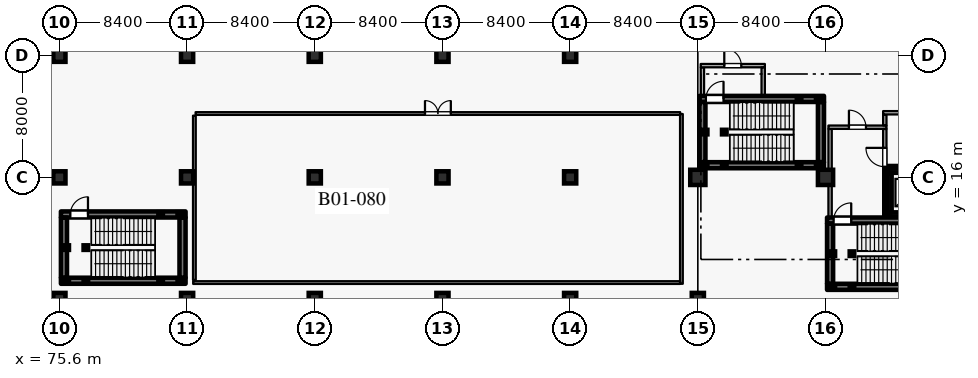
"""IFC4 building model, lengths in metres.
Left out: names, types, materials, properties, quantities, classifications, styles, units other than length and angle.
Written with IfcOpenShell. Run it as: python <this file> out.ifc"""

import sys

from ifc_helpers import new_model, si_unit, direction, frame, frame_2d, origin, origin_2d, place, context, subcontext, project, spatial, rectangle, hollow_rectangle, extrude, element, fill, save


model = new_model("IFC4")
c1 = context("Model", 3, precision=1e-05, world=origin(), true_north=direction((0.0, 1.0)))
c2 = subcontext(c1, "Body", "Model", "MODEL_VIEW")
j1 = project(units=[si_unit("LENGTHUNIT", "METRE"), si_unit("PLANEANGLEUNIT", "RADIAN")], contexts=[c1])
p1 = place(None, origin())
s1 = spatial("IfcSite", under=j1, at=p1, CompositionType="ELEMENT")
p2 = place(p1, origin())
s2 = spatial("IfcBuilding", under=s1, at=p2, CompositionType="ELEMENT")
p3 = place(p2, frame((0.0, 0.0, -5.4)))
s3 = spatial("IfcBuildingStorey", under=s2, at=p3, CompositionType="ELEMENT", Elevation=-5.4)
for number, where, z_axis, x_axis in (
    (1, (75.6, 8.0, 0.0), (0.0, 0.0, 1.0), (1.0, 0.0, 0.0)),
    (2, (75.6, 16.0, 0.0), (0.0, 0.0, 1.0), (1.0, 0.0, 0.0)),
    (3, (75.6, 24.0, 0.0), (0.0, 0.0, 1.0), (1.0, 0.0, 0.0)),
    (4, (84.0, 8.0, 0.0), (0.0, 0.0, 1.0), (1.0, 0.0, 0.0)),
    (5, (84.0, 16.0, 0.0), (0.0, 0.0, 1.0), (1.0, 0.0, 0.0)),
    (6, (84.0, 24.0, 0.0), (0.0, 0.0, 1.0), (1.0, 0.0, 0.0)),
    (7, (92.4, 8.0, 0.0), (0.0, 0.0, 1.0), (1.0, 0.0, 0.0)),
    (8, (92.4, 16.0, 0.0), (0.0, 0.0, 1.0), (1.0, 0.0, 0.0)),
    (9, (92.4, 24.0, 0.0), (0.0, 0.0, 1.0), (1.0, 0.0, 0.0)),
    (10, (100.8, 8.0, 0.0), (0.0, 0.0, 1.0), (1.0, 0.0, 0.0)),
    (11, (100.8, 16.0, 0.0), (0.0, 0.0, 1.0), (1.0, 0.0, 0.0)),
    (12, (100.8, 24.0, 0.0), (0.0, 0.0, 1.0), (1.0, 0.0, 0.0)),
    (13, (109.2, 8.0, 0.0), (0.0, 0.0, 1.0), (1.0, 0.0, 0.0)),
    (14, (109.2, 16.0, 0.0), (0.0, 0.0, 1.0), (1.0, 0.0, 0.0)),
    (15, (109.2, 24.0, 0.0), (0.0, 0.0, 1.0), (1.0, 0.0, 0.0)),
    (16, (117.6, 8.0, 0.0), (0.0, 0.0, 1.0), (1.0, 0.0, 0.0)),
):
    element("IfcColumn", number, at=place(p3, frame(where, z_axis=z_axis, x_axis=x_axis)), inside=s3, PredefinedType="COLUMN", context=c2, shape_type="SweptSolid", body=[
        extrude(rectangle(XDim=0.8, YDim=0.8, at=origin_2d()), origin(), (0.0, 0.0, 1.0), 5.4),
    ])
for number, where, z_axis, x_axis in (
    (17, (117.6, 16.0, 0.0), (0.0, 0.0, 1.0), (1.0, 0.0, 0.0)),
    (18, (126.0, 16.0, 0.0), (0.0, 0.0, 1.0), (1.0, 0.0, 0.0)),
):
    element("IfcColumn", number, at=place(p3, frame(where, z_axis=z_axis, x_axis=x_axis)), inside=s3, PredefinedType="COLUMN", context=c2, shape_type="SweptSolid", body=[
        extrude(rectangle(XDim=1.0, YDim=1.0, at=origin_2d()), origin(), (0.0, 0.0, 1.0), 5.4),
    ])
for number, where, z_axis, x_axis in (
    (19, (129.95, 13.4, -1.4), (0.0, 0.0, 1.0), (1.0, 0.0, 0.0)),
    (20, (133.65, 16.6, -1.4), (0.0, 0.0, 1.0), (-1.0, 0.0, 0.0)),
):
    element("IfcWall", number, at=place(p3, frame(where, z_axis=z_axis, x_axis=x_axis)), inside=s3, PredefinedType="USERDEFINED", context=c2, shape_type="SweptSolid", body=[
        extrude(rectangle(XDim=3.7, YDim=0.3, at=frame_2d((1.85, 0.0))), origin(), (0.0, 0.0, 1.0), 1.4),
    ])
p4 = place(p3, frame((130.05, 16.44, -1.4), z_axis=(0.0, 0.0, 1.0), x_axis=(0.0, -1.0, 0.0)))
e21 = element("IfcWall", 21, at=p4, inside=s3, PredefinedType="USERDEFINED", context=c2, shape_type="SweptSolid", body=[
    extrude(rectangle(XDim=2.88, YDim=0.3, at=frame_2d((1.44, 0.0))), origin(), (0.0, 0.0, 1.0), 1.4),
])
p5 = place(p3, frame((130.05, 13.55, 0.0), z_axis=(0.0, 0.0, 1.0), x_axis=(1.0, 0.0, 0.0)))
e22 = element("IfcWall", 22, at=p5, inside=s3, PredefinedType="SHEAR", context=c2, shape_type="SweptSolid", body=[
    extrude(rectangle(XDim=3.5, YDim=0.3, at=frame_2d((1.75, 0.0))), origin(), (0.0, 0.0, 1.0), 4.995),
])
p6 = place(p3, frame((133.91, 16.45, 0.0), z_axis=(0.0, 0.0, 1.0), x_axis=(-1.0, 0.0, 0.0)))
e23 = element("IfcWall", 23, at=p6, inside=s3, PredefinedType="SHEAR", context=c2, shape_type="SweptSolid", body=[
    extrude(rectangle(XDim=3.86, YDim=0.3, at=frame_2d((1.93, 0.0))), origin(), (0.0, 0.0, 1.0), 4.995),
])
p7 = place(p6, frame((1.485, 0.0, 0.0)))
e24 = element("IfcOpeningElement", 24, at=p7, cuts=e23, PredefinedType="OPENING", context=c2, shape_type="SweptSolid", body=[
    extrude(rectangle(XDim=1.25, YDim=2.25, at=frame_2d((0.625, 1.125))), frame((0.0, 0.16, 0.0), z_axis=(0.0, -1.0, 0.0), x_axis=(1.0, 0.0, 0.0)), (0.0, 0.0, 1.0), 0.32),
])
p8 = place(p3, frame((130.2, 16.295, 0.0), z_axis=(0.0, 0.0, 1.0), x_axis=(0.0, -1.0, 0.0)))
e25 = element("IfcWall", 25, at=p8, inside=s3, PredefinedType="SHEAR", context=c2, shape_type="SweptSolid", body=[
    extrude(rectangle(XDim=2.59, YDim=0.3, at=frame_2d((1.295, 0.0))), origin(), (0.0, 0.0, 1.0), 4.995),
])
p9 = place(p3, frame((126.1, 8.8, 0.0), z_axis=(0.0, 0.0, 1.0), x_axis=(1.0, 0.0, 0.0)))
e26 = element("IfcWall", 26, at=p9, inside=s3, PredefinedType="SHEAR", context=c2, shape_type="SweptSolid", body=[
    extrude(rectangle(XDim=8.2, YDim=0.4, at=frame_2d((4.1, 0.0))), origin(), (0.0, 0.0, 1.0), 4.995),
])
p10 = place(p3, frame((126.1, 13.16, 0.0), z_axis=(0.0, 0.0, 1.0), x_axis=(1.0, 0.0, 0.0)))
e27 = element("IfcWall", 27, at=p10, inside=s3, PredefinedType="SHEAR", context=c2, shape_type="SweptSolid", body=[
    extrude(rectangle(XDim=8.2, YDim=0.4, at=frame_2d((4.1, 0.0))), origin(), (0.0, 0.0, 1.0), 4.995),
])
p11 = place(p10, frame((0.43, 0.0, 0.0)))
e28 = element("IfcOpeningElement", 28, at=p11, cuts=e27, PredefinedType="OPENING", context=c2, shape_type="SweptSolid", body=[
    extrude(rectangle(XDim=1.16, YDim=2.2, at=frame_2d((0.58, 1.1))), frame((0.0, 0.21, 0.0), z_axis=(0.0, -1.0, 0.0), x_axis=(1.0, 0.0, 0.0)), (0.0, 0.0, 1.0), 0.42),
])
p12 = place(p3, frame((126.3, 9.005, 0.0), z_axis=(0.0, 0.0, 1.0), x_axis=(0.0, 1.0, 0.0)))
e29 = element("IfcWall", 29, at=p12, inside=s3, PredefinedType="SHEAR", context=c2, shape_type="SweptSolid", body=[
    extrude(rectangle(XDim=3.95, YDim=0.4, at=frame_2d((1.975, 0.0))), origin(), (0.0, 0.0, 1.0), 4.995),
])
p13 = place(p3, frame((126.3, 13.365, 0.0), z_axis=(0.0, 0.0, 1.0), x_axis=(0.0, 1.0, 0.0)))
e30 = element("IfcWall", 30, at=p13, inside=s3, PredefinedType="PARTITIONING", context=c2, shape_type="SweptSolid", body=[
    extrude(rectangle(XDim=5.82, YDim=0.22, at=frame_2d((2.91, 0.0))), origin(), (0.0, 0.0, 1.0), 4.05),
])
p14 = place(p3, frame((126.19, 19.3, 0.0), z_axis=(0.0, 0.0, 1.0), x_axis=(1.0, 0.0, 0.0)))
e31 = element("IfcWall", 31, at=p14, inside=s3, PredefinedType="PARTITIONING", context=c2, shape_type="SweptSolid", body=[
    extrude(rectangle(XDim=3.82, YDim=0.22, at=frame_2d((1.91, 0.0))), origin(), (0.0, 0.0, 1.0), 4.995),
])
p15 = place(p14, frame((1.35, 0.0, 0.0)))
e32 = element("IfcOpeningElement", 32, at=p15, cuts=e31, PredefinedType="OPENING", context=c2, shape_type="SweptSolid", body=[
    extrude(rectangle(XDim=1.12, YDim=2.2, at=frame_2d((0.56, 1.1))), frame((0.0, 0.12, 0.0), z_axis=(0.0, -1.0, 0.0), x_axis=(1.0, 0.0, 0.0)), (0.0, 0.0, 1.0), 0.24),
])
p16 = place(p3, frame((129.9, 13.365, 0.0), z_axis=(0.0, 0.0, 1.0), x_axis=(0.0, 1.0, 0.0)))
e33 = element("IfcWall", 33, at=p16, inside=s3, PredefinedType="PARTITIONING", context=c2, shape_type="SweptSolid", body=[
    extrude(rectangle(XDim=5.82, YDim=0.22, at=frame_2d((2.91, 0.0))), origin(), (0.0, 0.0, 1.0), 4.995),
])
p17 = place(p16, frame((3.335, 0.0, 0.0)))
e34 = element("IfcOpeningElement", 34, at=p17, cuts=e33, PredefinedType="OPENING", context=c2, shape_type="SweptSolid", body=[
    extrude(rectangle(XDim=1.24, YDim=2.2, at=frame_2d((0.62, 1.1))), frame((0.0, 0.12, 0.0), z_axis=(0.0, -1.0, 0.0), x_axis=(1.0, 0.0, 0.0)), (0.0, 0.0, 1.0), 0.24),
])
p18 = place(p3, frame((129.9, 19.415, 0.0), z_axis=(0.0, 0.0, 1.0), x_axis=(0.0, 1.0, 0.0)))
e35 = element("IfcWall", 35, at=p18, inside=s3, PredefinedType="PARTITIONING", context=c2, shape_type="SweptSolid", body=[
    extrude(rectangle(XDim=0.72, YDim=0.22, at=frame_2d((0.36, 0.0))), origin(), (0.0, 0.0, 1.0), 4.995),
])
p19 = place(p3, frame((129.79, 20.25, 0.0), z_axis=(0.0, 0.0, 1.0), x_axis=(1.0, 0.0, 0.0)))
e36 = element("IfcWall", 36, at=p19, inside=s3, PredefinedType="PARTITIONING", context=c2, shape_type="SweptSolid", body=[
    extrude(rectangle(XDim=4.02, YDim=0.22, at=frame_2d((2.01, 0.0))), origin(), (0.0, 0.0, 1.0), 4.995),
])
p20 = place(p19, frame((1.39, 0.0, 0.0)))
e37 = element("IfcOpeningElement", 37, at=p20, cuts=e36, PredefinedType="OPENING", context=c2, shape_type="SweptSolid", body=[
    extrude(rectangle(XDim=1.24, YDim=2.2, at=frame_2d((0.62, 1.1))), frame((0.0, 0.12, 0.0), z_axis=(0.0, -1.0, 0.0), x_axis=(1.0, 0.0, 0.0)), (0.0, 0.0, 1.0), 0.24),
])
for number, where, z_axis, x_axis in (
    (38, (126.48, 8.8, 0.0), (0.0, 0.0, 1.0), (1.0, 0.0, 0.0)),
    (39, (126.48, 10.98, 0.0), (0.0, 0.0, 1.0), (1.0, 0.0, 0.0)),
    (40, (127.74, 8.8, 0.0), (0.0, 0.0, 1.0), (1.0, 0.0, 0.0)),
    (41, (127.74, 10.98, 0.0), (0.0, 0.0, 1.0), (1.0, 0.0, 0.0)),
):
    element("IfcColumn", number, at=place(p3, frame(where, z_axis=z_axis, x_axis=x_axis)), inside=s3, PredefinedType="COLUMN", context=c2, shape_type="SweptSolid", body=[
        extrude(hollow_rectangle(XDim=0.3, YDim=0.3, WallThickness=0.012, at=origin_2d()), origin(), (0.0, 0.0, 1.0), 5.22),
    ])
p21 = place(p3, frame((117.7, 16.8, 0.0), z_axis=(0.0, 0.0, 1.0), x_axis=(1.0, 0.0, 0.0)))
e42 = element("IfcWall", 42, at=p21, inside=s3, PredefinedType="SHEAR", context=c2, shape_type="SweptSolid", body=[
    extrude(rectangle(XDim=8.2, YDim=0.4, at=frame_2d((4.1, 0.0))), origin(), (0.0, 0.0, 1.0), 4.995),
])
p22 = place(p3, frame((125.7, 17.005, 0.0), z_axis=(0.0, 0.0, 1.0), x_axis=(0.0, 1.0, 0.0)))
e43 = element("IfcWall", 43, at=p22, inside=s3, PredefinedType="SHEAR", context=c2, shape_type="SweptSolid", body=[
    extrude(rectangle(XDim=3.95, YDim=0.4, at=frame_2d((1.975, 0.0))), origin(), (0.0, 0.0, 1.0), 4.995),
])
p23 = place(p3, frame((117.7, 21.16, 0.0), z_axis=(0.0, 0.0, 1.0), x_axis=(1.0, 0.0, 0.0)))
e44 = element("IfcWall", 44, at=p23, inside=s3, PredefinedType="SHEAR", context=c2, shape_type="SweptSolid", body=[
    extrude(rectangle(XDim=8.2, YDim=0.4, at=frame_2d((4.1, 0.0))), origin(), (0.0, 0.0, 1.0), 4.995),
])
p24 = place(p23, frame((0.43, 0.0, 0.0)))
e45 = element("IfcOpeningElement", 45, at=p24, cuts=e44, PredefinedType="OPENING", context=c2, shape_type="SweptSolid", body=[
    extrude(rectangle(XDim=1.16, YDim=2.2, at=frame_2d((0.58, 1.1))), frame((0.0, 0.21, 0.0), z_axis=(0.0, -1.0, 0.0), x_axis=(1.0, 0.0, 0.0)), (0.0, 0.0, 1.0), 0.42),
])
p25 = place(p3, frame((117.9, 17.005, 0.0), z_axis=(0.0, 0.0, 1.0), x_axis=(0.0, 1.0, 0.0)))
e46 = element("IfcWall", 46, at=p25, inside=s3, PredefinedType="SHEAR", context=c2, shape_type="SweptSolid", body=[
    extrude(rectangle(XDim=3.95, YDim=0.4, at=frame_2d((1.975, 0.0))), origin(), (0.0, 0.0, 1.0), 4.995),
])
p26 = place(p3, frame((117.9, 21.365, 0.0), z_axis=(0.0, 0.0, 1.0), x_axis=(0.0, 1.0, 0.0)))
e47 = element("IfcWall", 47, at=p26, inside=s3, PredefinedType="PARTITIONING", context=c2, shape_type="SweptSolid", body=[
    extrude(rectangle(XDim=1.87, YDim=0.22, at=frame_2d((0.935, 0.0))), origin(), (0.0, 0.0, 1.0), 4.1),
])
p27 = place(p3, frame((117.79, 23.35, 0.0), z_axis=(0.0, 0.0, 1.0), x_axis=(1.0, 0.0, 0.0)))
e48 = element("IfcWall", 48, at=p27, inside=s3, PredefinedType="PARTITIONING", context=c2, shape_type="SweptSolid", body=[
    extrude(rectangle(XDim=4.22, YDim=0.22, at=frame_2d((2.11, 0.0))), origin(), (0.0, 0.0, 1.0), 4.995),
])
p28 = place(p27, frame((1.55, 0.0, 0.0)))
e49 = element("IfcOpeningElement", 49, at=p28, cuts=e48, PredefinedType="OPENING", context=c2, shape_type="SweptSolid", body=[
    extrude(rectangle(XDim=1.12, YDim=2.2, at=frame_2d((0.56, 1.1))), frame((0.0, 0.12, 0.0), z_axis=(0.0, -1.0, 0.0), x_axis=(1.0, 0.0, 0.0)), (0.0, 0.0, 1.0), 0.24),
])
p29 = place(p3, frame((121.9, 21.365, 0.0), z_axis=(0.0, 0.0, 1.0), x_axis=(0.0, 1.0, 0.0)))
e50 = element("IfcWall", 50, at=p29, inside=s3, PredefinedType="PARTITIONING", context=c2, shape_type="SweptSolid", body=[
    extrude(rectangle(XDim=1.87, YDim=0.22, at=frame_2d((0.935, 0.0))), origin(), (0.0, 0.0, 1.0), 4.995),
])
for number, where, z_axis, x_axis in (
    (51, (118.08, 16.8, 0.0), (0.0, 0.0, 1.0), (1.0, 0.0, 0.0)),
    (52, (118.08, 18.98, 0.0), (0.0, 0.0, 1.0), (1.0, 0.0, 0.0)),
    (53, (119.34, 16.8, 0.0), (0.0, 0.0, 1.0), (1.0, 0.0, 0.0)),
    (54, (119.34, 18.98, 0.0), (0.0, 0.0, 1.0), (1.0, 0.0, 0.0)),
):
    element("IfcColumn", number, at=place(p3, frame(where, z_axis=z_axis, x_axis=x_axis)), inside=s3, PredefinedType="COLUMN", context=c2, shape_type="SweptSolid", body=[
        extrude(hollow_rectangle(XDim=0.3, YDim=0.3, WallThickness=0.012, at=origin_2d()), origin(), (0.0, 0.0, 1.0), 5.22),
    ])
for number, where, z_axis, x_axis in (
    (55, (124.26, 16.8, 0.0), (0.0, 0.0, 1.0), (1.0, 0.0, 0.0)),
    (56, (124.26, 21.16, 0.0), (0.0, 0.0, 1.0), (1.0, 0.0, 0.0)),
    (57, (125.52, 16.8, 0.0), (0.0, 0.0, 1.0), (1.0, 0.0, 0.0)),
    (58, (125.52, 21.16, 0.0), (0.0, 0.0, 1.0), (1.0, 0.0, 0.0)),
):
    element("IfcColumn", number, at=place(p3, frame(where, z_axis=z_axis, x_axis=x_axis)), inside=s3, PredefinedType="COLUMN", context=c2, shape_type="SweptSolid", body=[
        extrude(hollow_rectangle(XDim=0.3, YDim=0.3, WallThickness=0.012, at=origin_2d()), origin(), (0.0, 0.0, 1.0), 2.52),
    ])
p30 = place(p3, frame((75.7, 9.2, 0.0), z_axis=(0.0, 0.0, 1.0), x_axis=(1.0, 0.0, 0.0)))
e59 = element("IfcWall", 59, at=p30, inside=s3, PredefinedType="SHEAR", context=c2, shape_type="SweptSolid", body=[
    extrude(rectangle(XDim=8.2, YDim=0.4, at=frame_2d((4.1, 0.0))), origin(), (0.0, 0.0, 1.0), 4.995),
])
p31 = place(p3, frame((83.7, 9.405, 0.0), z_axis=(0.0, 0.0, 1.0), x_axis=(0.0, 1.0, 0.0)))
e60 = element("IfcWall", 60, at=p31, inside=s3, PredefinedType="SHEAR", context=c2, shape_type="SweptSolid", body=[
    extrude(rectangle(XDim=3.95, YDim=0.4, at=frame_2d((1.975, 0.0))), origin(), (0.0, 0.0, 1.0), 4.995),
])
p32 = place(p3, frame((75.7, 13.56, 0.0), z_axis=(0.0, 0.0, 1.0), x_axis=(1.0, 0.0, 0.0)))
e61 = element("IfcWall", 61, at=p32, inside=s3, PredefinedType="SHEAR", context=c2, shape_type="SweptSolid", body=[
    extrude(rectangle(XDim=8.2, YDim=0.4, at=frame_2d((4.1, 0.0))), origin(), (0.0, 0.0, 1.0), 4.995),
])
p33 = place(p32, frame((0.62, 0.0, 0.0)))
e62 = element("IfcOpeningElement", 62, at=p33, cuts=e61, PredefinedType="OPENING", context=c2, shape_type="SweptSolid", body=[
    extrude(rectangle(XDim=1.16, YDim=2.2, at=frame_2d((0.58, 1.1))), frame((0.0, 0.21, 0.0), z_axis=(0.0, -1.0, 0.0), x_axis=(1.0, 0.0, 0.0)), (0.0, 0.0, 1.0), 0.42),
])
p34 = place(p3, frame((75.9, 9.405, 0.0), z_axis=(0.0, 0.0, 1.0), x_axis=(0.0, 1.0, 0.0)))
e63 = element("IfcWall", 63, at=p34, inside=s3, PredefinedType="SHEAR", context=c2, shape_type="SweptSolid", body=[
    extrude(rectangle(XDim=3.95, YDim=0.4, at=frame_2d((1.975, 0.0))), origin(), (0.0, 0.0, 1.0), 4.995),
])
for number, where, z_axis, x_axis in (
    (64, (76.08, 9.2, 0.0), (0.0, 0.0, 1.0), (1.0, 0.0, 0.0)),
    (65, (76.08, 11.38, 0.0), (0.0, 0.0, 1.0), (1.0, 0.0, 0.0)),
    (66, (77.34, 9.2, 0.0), (0.0, 0.0, 1.0), (1.0, 0.0, 0.0)),
    (67, (77.34, 11.38, 0.0), (0.0, 0.0, 1.0), (1.0, 0.0, 0.0)),
):
    element("IfcColumn", number, at=place(p3, frame(where, z_axis=z_axis, x_axis=x_axis)), inside=s3, PredefinedType="COLUMN", context=c2, shape_type="SweptSolid", body=[
        extrude(hollow_rectangle(XDim=0.3, YDim=0.3, WallThickness=0.012, at=origin_2d()), origin(), (0.0, 0.0, 1.0), 5.22),
    ])
for number, where, z_axis, x_axis in (
    (68, (82.26, 9.2, 0.0), (0.0, 0.0, 1.0), (1.0, 0.0, 0.0)),
    (69, (82.26, 13.56, 0.0), (0.0, 0.0, 1.0), (1.0, 0.0, 0.0)),
    (70, (83.52, 9.2, 0.0), (0.0, 0.0, 1.0), (1.0, 0.0, 0.0)),
    (71, (83.52, 13.56, 0.0), (0.0, 0.0, 1.0), (1.0, 0.0, 0.0)),
):
    element("IfcColumn", number, at=place(p3, frame(where, z_axis=z_axis, x_axis=x_axis)), inside=s3, PredefinedType="COLUMN", context=c2, shape_type="SweptSolid", body=[
        extrude(hollow_rectangle(XDim=0.3, YDim=0.3, WallThickness=0.012, at=origin_2d()), origin(), (0.0, 0.0, 1.0), 2.52),
    ])
p35 = place(p3, frame((84.56, 20.2, 0.0), z_axis=(0.0, 0.0, 1.0), x_axis=(1.0, 0.0, 0.0)))
e72 = element("IfcWall", 72, at=p35, inside=s3, PredefinedType="PARTITIONING", context=c2, shape_type="SweptSolid", body=[
    extrude(rectangle(XDim=31.88, YDim=0.18, at=frame_2d((15.94, 0.0))), origin(), (0.0, 0.0, 1.0), 4.995),
])
p36 = place(p35, frame((15.09, 0.0, 0.0)))
e73 = element("IfcOpeningElement", 73, at=p36, cuts=e72, PredefinedType="OPENING", context=c2, shape_type="SweptSolid", body=[
    extrude(rectangle(XDim=1.7, YDim=2.3, at=frame_2d((0.85, 1.15))), frame((0.0, 0.1, 0.0), z_axis=(0.0, -1.0, 0.0), x_axis=(1.0, 0.0, 0.0)), (0.0, 0.0, 1.0), 0.2),
])
p37 = place(p3, frame((84.48, 9.25, 0.0), z_axis=(0.0, 0.0, 1.0), x_axis=(0.0, 1.0, 0.0)))
e74 = element("IfcWall", 74, at=p37, inside=s3, PredefinedType="PARTITIONING", context=c2, shape_type="SweptSolid", body=[
    extrude(rectangle(XDim=10.81, YDim=0.18, at=frame_2d((5.405, 0.0))), origin(), (0.0, 0.0, 1.0), 4.995),
])
p38 = place(p3, frame((116.52, 9.0, 0.0), z_axis=(0.0, 0.0, 1.0), x_axis=(0.0, 1.0, 0.0)))
e75 = element("IfcWall", 75, at=p38, inside=s3, PredefinedType="PARTITIONING", context=c2, shape_type="SweptSolid", body=[
    extrude(rectangle(XDim=11.168, YDim=0.18, at=frame_2d((5.584, 0.0))), origin(), (0.0, 0.0, 1.0), 4.995),
])
p39 = place(p3, frame((84.4, 9.08, 0.0), z_axis=(0.0, 0.0, 1.0), x_axis=(1.0, 0.0, 0.0)))
e76 = element("IfcWall", 76, at=p39, inside=s3, PredefinedType="PARTITIONING", context=c2, shape_type="SweptSolid", body=[
    extrude(rectangle(XDim=32.03, YDim=0.18, at=frame_2d((16.015, 0.0))), origin(), (0.0, 0.0, 1.0), 4.995),
])
p40 = place(p11, origin())
e77 = element("IfcDoor", 77, at=p40, inside=s3, OperationType="SINGLE_SWING_RIGHT", PredefinedType="DOOR", context=c2, shape_type="SweptSolid", body=[
    extrude(rectangle(XDim=1.16, YDim=2.2, at=frame_2d((0.58, 1.1))), frame((0.0, 0.025, 0.0), z_axis=(0.0, -1.0, 0.0), x_axis=(1.0, 0.0, 0.0)), (0.0, 0.0, 1.0), 0.05),
])
fill(e28, e77)
p41 = place(p15, origin())
e78 = element("IfcDoor", 78, at=p41, inside=s3, OperationType="SINGLE_SWING_LEFT", PredefinedType="DOOR", context=c2, shape_type="SweptSolid", body=[
    extrude(rectangle(XDim=1.12, YDim=2.2, at=frame_2d((0.56, 1.1))), frame((0.0, 0.025, 0.0), z_axis=(0.0, -1.0, 0.0), x_axis=(1.0, 0.0, 0.0)), (0.0, 0.0, 1.0), 0.05),
])
fill(e32, e78)
p42 = place(p17, origin())
e79 = element("IfcDoor", 79, at=p42, inside=s3, OperationType="SINGLE_SWING_RIGHT", PredefinedType="DOOR", context=c2, shape_type="SweptSolid", body=[
    extrude(rectangle(XDim=1.24, YDim=2.2, at=frame_2d((0.62, 1.1))), frame((0.0, 0.025, 0.0), z_axis=(0.0, -1.0, 0.0), x_axis=(1.0, 0.0, 0.0)), (0.0, 0.0, 1.0), 0.05),
])
fill(e34, e79)
p43 = place(p24, origin())
e80 = element("IfcDoor", 80, at=p43, inside=s3, OperationType="SINGLE_SWING_RIGHT", PredefinedType="DOOR", context=c2, shape_type="SweptSolid", body=[
    extrude(rectangle(XDim=1.16, YDim=2.2, at=frame_2d((0.58, 1.1))), frame((0.0, 0.025, 0.0), z_axis=(0.0, -1.0, 0.0), x_axis=(1.0, 0.0, 0.0)), (0.0, 0.0, 1.0), 0.05),
])
fill(e45, e80)
p44 = place(p28, origin())
e81 = element("IfcDoor", 81, at=p44, inside=s3, OperationType="SINGLE_SWING_LEFT", PredefinedType="DOOR", context=c2, shape_type="SweptSolid", body=[
    extrude(rectangle(XDim=1.12, YDim=2.2, at=frame_2d((0.56, 1.1))), frame((0.0, 0.025, 0.0), z_axis=(0.0, -1.0, 0.0), x_axis=(1.0, 0.0, 0.0)), (0.0, 0.0, 1.0), 0.05),
])
fill(e49, e81)
p45 = place(p33, origin())
e82 = element("IfcDoor", 82, at=p45, inside=s3, OperationType="SINGLE_SWING_RIGHT", PredefinedType="DOOR", context=c2, shape_type="SweptSolid", body=[
    extrude(rectangle(XDim=1.16, YDim=2.2, at=frame_2d((0.58, 1.1))), frame((0.0, 0.025, 0.0), z_axis=(0.0, -1.0, 0.0), x_axis=(1.0, 0.0, 0.0)), (0.0, 0.0, 1.0), 0.05),
])
fill(e62, e82)
p46 = place(p36, origin())
e83 = element("IfcDoor", 83, at=p46, inside=s3, OperationType="DOUBLE_DOOR_SINGLE_SWING", PredefinedType="DOOR", context=c2, shape_type="SweptSolid", body=[
    extrude(rectangle(XDim=1.7, YDim=2.3, at=frame_2d((0.85, 1.15))), frame((0.0, 0.025, 0.0), z_axis=(0.0, -1.0, 0.0), x_axis=(1.0, 0.0, 0.0)), (0.0, 0.0, 1.0), 0.05),
])
fill(e73, e83)
save(model, sys.argv[1])
